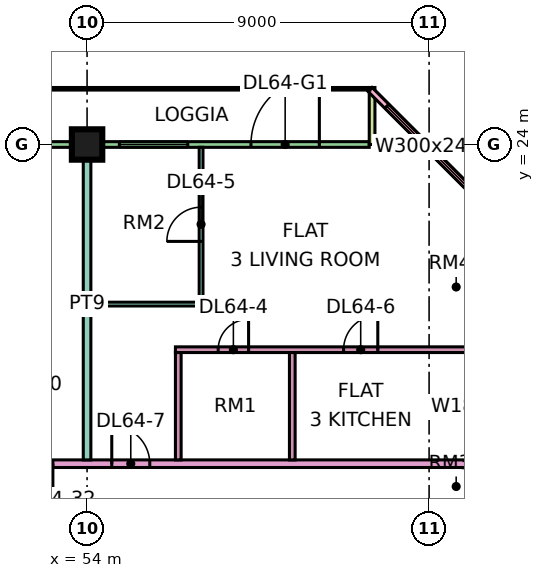
"""IFC4 building model, lengths in metres.
Left out: names, types, materials, properties, quantities, classifications, styles, units other than length and angle.
Written with IfcOpenShell. Run it as: python <this file> out.ifc"""

import sys

from ifc_helpers import new_model, si_unit, direction, frame, frame_2d, origin, origin_2d, place, context, subcontext, project, spatial, rectangle, extrude, element, fill, save


model = new_model("IFC4")
c1 = context("Model", 3, precision=1e-05, world=origin(), true_north=direction((0.0, 1.0)))
c2 = subcontext(c1, "Body", "Model", "MODEL_VIEW")
j1 = project(units=[si_unit("LENGTHUNIT", "METRE"), si_unit("PLANEANGLEUNIT", "RADIAN")], contexts=[c1])
p1 = place(None, origin())
s1 = spatial("IfcSite", under=j1, at=p1, CompositionType="ELEMENT")
p2 = place(p1, origin())
s2 = spatial("IfcBuilding", under=s1, at=p2, CompositionType="ELEMENT")
p3 = place(p2, frame((0.0, 0.0, 277.15)))
s3 = spatial("IfcBuildingStorey", under=s2, at=p3, CompositionType="ELEMENT", Elevation=277.15)
p4 = place(p3, frame((54.0, 24.0, 0.0), z_axis=(0.0, 0.0, 1.0), x_axis=(1.0, 0.0, 0.0)))
e1 = element("IfcColumn", 1, at=p4, inside=s3, PredefinedType="COLUMN", context=c2, shape_type="SweptSolid", body=[
    extrude(rectangle(XDim=0.8, YDim=0.8, at=origin_2d()), origin(), (0.0, 0.0, 1.0), 3.75),
])
p5 = place(p3, frame((61.425, 24.0, 0.0), z_axis=(0.0, 0.0, 1.0), x_axis=(-1.0, 0.0, 0.0)))
e2 = element("IfcWall", 2, at=p5, inside=s3, PredefinedType="SOLIDWALL", context=c2, shape_type="SweptSolid", body=[
    extrude(rectangle(XDim=13.35, YDim=0.15, at=frame_2d((6.675, 0.0))), origin(), (0.0, 0.0, 1.0), 3.35),
])
p6 = place(p5, frame((1.312, 0.0, 0.0)))
e3 = element("IfcOpeningElement", 3, at=p6, cuts=e2, PredefinedType="OPENING", context=c2, shape_type="SweptSolid", body=[
    extrude(rectangle(XDim=1.8, YDim=2.4, at=frame_2d((0.9, 1.2))), frame((0.0, 0.085, 0.0), z_axis=(0.0, -1.0, 0.0), x_axis=(1.0, 0.0, 0.0)), (0.0, 0.0, 1.0), 0.17),
])
p7 = place(p5, frame((4.775, 0.0, 0.45)))
e4 = element("IfcOpeningElement", 4, at=p7, cuts=e2, PredefinedType="OPENING", context=c2, shape_type="SweptSolid", body=[
    extrude(rectangle(XDim=1.8, YDim=2.4, at=frame_2d((0.9, 1.2))), frame((0.0, 0.085, 0.0), z_axis=(0.0, -1.0, 0.0), x_axis=(1.0, 0.0, 0.0)), (0.0, 0.0, 1.0), 0.17),
])
p8 = place(p5, frame((8.538, 0.0, 0.45)))
e5 = element("IfcOpeningElement", 5, at=p8, cuts=e2, PredefinedType="OPENING", context=c2, shape_type="SweptSolid", body=[
    extrude(rectangle(XDim=4.2, YDim=2.4, at=frame_2d((2.1, 1.2))), frame((0.0, 0.085, 0.0), z_axis=(0.0, -1.0, 0.0), x_axis=(1.0, 0.0, 0.0)), (0.0, 0.0, 1.0), 0.17),
])
p9 = place(p3, frame((61.5, 25.5, 0.0), z_axis=(0.0, 0.0, 1.0), x_axis=(0.0, -1.0, 0.0)))
e6 = element("IfcWall", 6, at=p9, inside=s3, PredefinedType="SOLIDWALL", context=c2, shape_type="SweptSolid", body=[
    extrude(rectangle(XDim=1.5, YDim=0.15, at=frame_2d((0.75, 0.0))), origin(), (0.0, 0.0, 1.0), 3.35),
])
p10 = place(p3, frame((64.447, 22.447, 0.0), z_axis=(0.0, 0.0, 1.0), x_axis=(-0.707106781187, 0.707106781187, 0.0)))
e7 = element("IfcWall", 7, at=p10, inside=s3, PredefinedType="SOLIDWALL", context=c2, shape_type="SweptSolid", body=[
    extrude(rectangle(XDim=4.243, YDim=0.15, at=frame_2d((2.121, 0.0))), origin(), (0.0, 0.0, 1.0), 3.35),
])
p11 = place(p10, frame((0.621, 0.0, 0.45)))
e8 = element("IfcOpeningElement", 8, at=p11, cuts=e7, PredefinedType="OPENING", context=c2, shape_type="SweptSolid", body=[
    extrude(rectangle(XDim=3.0, YDim=2.4, at=frame_2d((1.5, 1.2))), frame((0.0, 0.085, 0.0), z_axis=(0.0, -1.0, 0.0), x_axis=(1.0, 0.0, 0.0)), (0.0, 0.0, 1.0), 0.17),
])
p12 = place(p3, frame((51.225, 15.6, 0.0), z_axis=(0.0, 0.0, 1.0), x_axis=(1.0, 0.0, 0.0)))
e9 = element("IfcWall", 9, at=p12, inside=s3, PredefinedType="PARTITIONING", context=c2, shape_type="SweptSolid", body=[
    extrude(rectangle(XDim=13.125, YDim=0.2, at=frame_2d((6.562, 0.0))), origin(), (0.0, 0.0, 1.0), 3.35),
])
p13 = place(p12, frame((3.425, 0.0, 0.0)))
e10 = element("IfcOpeningElement", 10, at=p13, cuts=e9, PredefinedType="OPENING", context=c2, shape_type="SweptSolid", body=[
    extrude(rectangle(XDim=1.0, YDim=2.1, at=frame_2d((0.5, 1.05))), frame((0.0, 0.11, 0.0), z_axis=(0.0, -1.0, 0.0), x_axis=(1.0, 0.0, 0.0)), (0.0, 0.0, 1.0), 0.22),
])
p14 = place(p12, frame((0.875, 0.0, 0.0)))
e11 = element("IfcOpeningElement", 11, at=p14, cuts=e9, PredefinedType="OPENING", context=c2, shape_type="SweptSolid", body=[
    extrude(rectangle(XDim=1.0, YDim=2.1, at=frame_2d((0.5, 1.05))), frame((0.0, 0.11, 0.0), z_axis=(0.0, -1.0, 0.0), x_axis=(1.0, 0.0, 0.0)), (0.0, 0.0, 1.0), 0.22),
])
p15 = place(p3, frame((54.0, 15.7, 0.0), z_axis=(0.0, 0.0, 1.0), x_axis=(0.0, 1.0, 0.0)))
e12 = element("IfcWall", 12, at=p15, inside=s3, PredefinedType="PARTITIONING", context=c2, shape_type="SweptSolid", body=[
    extrude(rectangle(XDim=8.226, YDim=0.2, at=frame_2d((4.113, 0.0))), origin(), (0.0, 0.0, 1.0), 3.35),
])
p16 = place(p3, frame((54.1, 19.8, 0.0), z_axis=(0.0, 0.0, 1.0), x_axis=(1.0, 0.0, 0.0)))
e13 = element("IfcWall", 13, at=p16, inside=s3, PredefinedType="PARTITIONING", context=c2, shape_type="SweptSolid", body=[
    extrude(rectangle(XDim=2.85, YDim=0.1, at=frame_2d((1.425, 0.0))), origin(), (0.0, 0.0, 1.0), 3.35),
])
p17 = place(p3, frame((56.325, 18.6, 0.0), z_axis=(0.0, 0.0, 1.0), x_axis=(1.0, 0.0, 0.0)))
e14 = element("IfcWall", 14, at=p17, inside=s3, PredefinedType="PARTITIONING", context=c2, shape_type="SweptSolid", body=[
    extrude(rectangle(XDim=8.025, YDim=0.15, at=frame_2d((4.013, 0.0))), origin(), (0.0, 0.0, 1.0), 3.35),
])
p18 = place(p17, frame((1.125, 0.0, 0.0)))
e15 = element("IfcOpeningElement", 15, at=p18, cuts=e14, PredefinedType="OPENING", context=c2, shape_type="SweptSolid", body=[
    extrude(rectangle(XDim=0.8, YDim=2.1, at=frame_2d((0.4, 1.05))), frame((0.0, 0.085, 0.0), z_axis=(0.0, -1.0, 0.0), x_axis=(1.0, 0.0, 0.0)), (0.0, 0.0, 1.0), 0.17),
])
p19 = place(p17, frame((4.425, 0.0, 0.0)))
e16 = element("IfcOpeningElement", 16, at=p19, cuts=e14, PredefinedType="OPENING", context=c2, shape_type="SweptSolid", body=[
    extrude(rectangle(XDim=0.9, YDim=2.1, at=frame_2d((0.45, 1.05))), frame((0.0, 0.085, 0.0), z_axis=(0.0, -1.0, 0.0), x_axis=(1.0, 0.0, 0.0)), (0.0, 0.0, 1.0), 0.17),
])
p20 = place(p3, frame((56.4, 15.7, 0.0), z_axis=(0.0, 0.0, 1.0), x_axis=(0.0, 1.0, 0.0)))
e17 = element("IfcWall", 17, at=p20, inside=s3, PredefinedType="PARTITIONING", context=c2, shape_type="SweptSolid", body=[
    extrude(rectangle(XDim=2.825, YDim=0.15, at=frame_2d((1.413, 0.0))), origin(), (0.0, 0.0, 1.0), 3.35),
])
p21 = place(p3, frame((57.0, 19.75, 0.0), z_axis=(0.0, 0.0, 1.0), x_axis=(0.0, 1.0, 0.0)))
e18 = element("IfcWall", 18, at=p21, inside=s3, PredefinedType="PARTITIONING", context=c2, shape_type="SweptSolid", body=[
    extrude(rectangle(XDim=4.176, YDim=0.1, at=frame_2d((2.088, 0.0))), origin(), (0.0, 0.0, 1.0), 3.35),
])
p22 = place(p21, frame((1.7, 0.0, 0.0)))
e19 = element("IfcOpeningElement", 19, at=p22, cuts=e18, PredefinedType="OPENING", context=c2, shape_type="SweptSolid", body=[
    extrude(rectangle(XDim=0.9, YDim=2.1, at=frame_2d((0.45, 1.05))), frame((0.0, 0.06, 0.0), z_axis=(0.0, -1.0, 0.0), x_axis=(1.0, 0.0, 0.0)), (0.0, 0.0, 1.0), 0.12),
])
p23 = place(p3, frame((59.4, 15.7, 0.0), z_axis=(0.0, 0.0, 1.0), x_axis=(0.0, 1.0, 0.0)))
e20 = element("IfcWall", 20, at=p23, inside=s3, PredefinedType="PARTITIONING", context=c2, shape_type="SweptSolid", body=[
    extrude(rectangle(XDim=2.825, YDim=0.15, at=frame_2d((1.413, 0.0))), origin(), (0.0, 0.0, 1.0), 3.35),
])
p24 = place(p6, frame((1.8, 0.0, 0.0), z_axis=(0.0, 0.0, 1.0), x_axis=(-1.0, 0.0, 0.0)))
e21 = element("IfcDoor", 21, at=p24, inside=s3, OperationType="DOUBLE_DOOR_SINGLE_SWING", PredefinedType="DOOR", context=c2, shape_type="SweptSolid", body=[
    extrude(rectangle(XDim=1.8, YDim=2.4, at=frame_2d((0.9, 1.2))), frame((0.0, 0.025, 0.0), z_axis=(0.0, -1.0, 0.0), x_axis=(1.0, 0.0, 0.0)), (0.0, 0.0, 1.0), 0.05),
])
fill(e3, e21)
p25 = place(p7, origin())
e22 = element("IfcWindow", 22, at=p25, inside=s3, PartitioningType="SINGLE_PANEL", PredefinedType="WINDOW", context=c2, shape_type="SweptSolid", body=[
    extrude(rectangle(XDim=1.8, YDim=2.4, at=frame_2d((0.9, 1.2))), frame((0.0, 0.03, 0.0), z_axis=(0.0, -1.0, 0.0), x_axis=(1.0, 0.0, 0.0)), (0.0, 0.0, 1.0), 0.06),
])
fill(e4, e22)
p26 = place(p11, origin())
e23 = element("IfcWindow", 23, at=p26, inside=s3, PartitioningType="SINGLE_PANEL", PredefinedType="WINDOW", context=c2, shape_type="SweptSolid", body=[
    extrude(rectangle(XDim=3.0, YDim=2.4, at=frame_2d((1.5, 1.2))), frame((0.0, 0.03, 0.0), z_axis=(0.0, -1.0, 0.0), x_axis=(1.0, 0.0, 0.0)), (0.0, 0.0, 1.0), 0.06),
])
fill(e8, e23)
p27 = place(p18, frame((0.8, 0.0, 0.0), z_axis=(0.0, 0.0, 1.0), x_axis=(-1.0, 0.0, 0.0)))
e24 = element("IfcDoor", 24, at=p27, inside=s3, OperationType="SINGLE_SWING_RIGHT", PredefinedType="DOOR", context=c2, shape_type="SweptSolid", body=[
    extrude(rectangle(XDim=0.8, YDim=2.1, at=frame_2d((0.4, 1.05))), frame((0.0, 0.025, 0.0), z_axis=(0.0, -1.0, 0.0), x_axis=(1.0, 0.0, 0.0)), (0.0, 0.0, 1.0), 0.05),
])
fill(e15, e24)
p28 = place(p22, origin())
e25 = element("IfcDoor", 25, at=p28, inside=s3, OperationType="SINGLE_SWING_LEFT", PredefinedType="DOOR", context=c2, shape_type="SweptSolid", body=[
    extrude(rectangle(XDim=0.9, YDim=2.1, at=frame_2d((0.45, 1.05))), frame((0.0, 0.025, 0.0), z_axis=(0.0, -1.0, 0.0), x_axis=(1.0, 0.0, 0.0)), (0.0, 0.0, 1.0), 0.05),
])
fill(e19, e25)
p29 = place(p19, frame((0.9, 0.0, 0.0), z_axis=(0.0, 0.0, 1.0), x_axis=(-1.0, 0.0, 0.0)))
e26 = element("IfcDoor", 26, at=p29, inside=s3, OperationType="SINGLE_SWING_RIGHT", PredefinedType="DOOR", context=c2, shape_type="SweptSolid", body=[
    extrude(rectangle(XDim=0.9, YDim=2.1, at=frame_2d((0.45, 1.05))), frame((0.0, 0.025, 0.0), z_axis=(0.0, -1.0, 0.0), x_axis=(1.0, 0.0, 0.0)), (0.0, 0.0, 1.0), 0.05),
])
fill(e16, e26)
p30 = place(p13, origin())
e27 = element("IfcDoor", 27, at=p30, inside=s3, OperationType="SINGLE_SWING_LEFT", PredefinedType="DOOR", context=c2, shape_type="SweptSolid", body=[
    extrude(rectangle(XDim=1.0, YDim=2.1, at=frame_2d((0.5, 1.05))), frame((0.0, 0.025, 0.0), z_axis=(0.0, -1.0, 0.0), x_axis=(1.0, 0.0, 0.0)), (0.0, 0.0, 1.0), 0.05),
])
fill(e10, e27)
p31 = place(p14, origin())
e28 = element("IfcDoor", 28, at=p31, inside=s3, OperationType="SINGLE_SWING_RIGHT", PredefinedType="DOOR", context=c2, shape_type="SweptSolid", body=[
    extrude(rectangle(XDim=1.0, YDim=2.1, at=frame_2d((0.5, 1.05))), frame((0.0, 0.025, 0.0), z_axis=(0.0, -1.0, 0.0), x_axis=(1.0, 0.0, 0.0)), (0.0, 0.0, 1.0), 0.05),
])
fill(e11, e28)
save(model, sys.argv[1])
